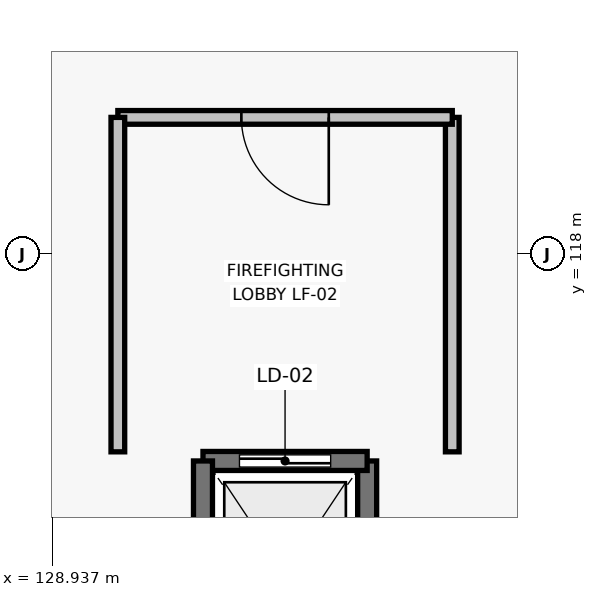
"""IFC4 building model, lengths in metres.
Left out: names, types, materials, properties, quantities, classifications, styles, units other than length and angle.
Written with IfcOpenShell. Run it as: python <this file> out.ifc"""

import sys

from ifc_helpers import new_model, si_unit, direction, frame, frame_2d, origin, place, context, subcontext, project, spatial, rectangle, extrude, element, fill, save


model = new_model("IFC4")
c1 = context("Model", 3, precision=1e-05, world=origin(), true_north=direction((0.0, 1.0)))
c2 = subcontext(c1, "Body", "Model", "MODEL_VIEW")
j1 = project(units=[si_unit("LENGTHUNIT", "METRE"), si_unit("PLANEANGLEUNIT", "RADIAN")], contexts=[c1])
p1 = place(None, origin())
s1 = spatial("IfcSite", under=j1, at=p1, CompositionType="ELEMENT")
p2 = place(p1, origin())
s2 = spatial("IfcBuilding", under=s1, at=p2, CompositionType="ELEMENT")
p3 = place(p2, frame((0.0, 0.0, 10.8)))
s3 = spatial("IfcBuildingStorey", under=s2, at=p3, CompositionType="ELEMENT", Elevation=10.8)
p4 = place(p3, frame((133.08, 112.32, 0.0), z_axis=(0.0, 0.0, 1.0), x_axis=(0.0, 1.0, 0.0)))
e1 = element("IfcWall", 1, at=p4, inside=s3, PredefinedType="SHEAR", context=c2, shape_type="SweptSolid", body=[
    extrude(rectangle(XDim=2.96, YDim=0.25, at=frame_2d((1.48, 0.0))), origin(), (0.0, 0.0, 1.0), 5.8),
])
p5 = place(p3, frame((133.08, 115.28, 0.0), z_axis=(0.0, 0.0, 1.0), x_axis=(-1.0, 0.0, 0.0)))
e2 = element("IfcWall", 2, at=p5, inside=s3, PredefinedType="SHEAR", context=c2, shape_type="SweptSolid", body=[
    extrude(rectangle(XDim=2.16, YDim=0.25, at=frame_2d((1.08, 0.0))), origin(), (0.0, 0.0, 1.0), 5.8),
])
p6 = place(p5, frame((0.48, 0.0, 0.0)))
e3 = element("IfcOpeningElement", 3, at=p6, cuts=e2, PredefinedType="OPENING", context=c2, shape_type="SweptSolid", body=[
    extrude(rectangle(XDim=1.2, YDim=2.2, at=frame_2d((0.6, 1.1))), frame((0.0, 0.135, 0.0), z_axis=(0.0, -1.0, 0.0), x_axis=(1.0, 0.0, 0.0)), (0.0, 0.0, 1.0), 0.27),
])
p7 = place(p3, frame((130.92, 115.28, 0.0), z_axis=(0.0, 0.0, 1.0), x_axis=(0.0, -1.0, 0.0)))
e4 = element("IfcWall", 4, at=p7, inside=s3, PredefinedType="SHEAR", context=c2, shape_type="SweptSolid", body=[
    extrude(rectangle(XDim=2.96, YDim=0.25, at=frame_2d((1.48, 0.0))), origin(), (0.0, 0.0, 1.0), 5.8),
])
p8 = place(p3, frame((134.2, 115.4, 0.0), z_axis=(0.0, 0.0, 1.0), x_axis=(0.0, 1.0, 0.0)))
e5 = element("IfcWall", 5, at=p8, inside=s3, PredefinedType="PARTITIONING", context=c2, shape_type="SweptSolid", body=[
    extrude(rectangle(XDim=4.4, YDim=0.18, at=frame_2d((2.2, 0.0))), origin(), (0.0, 0.0, 1.0), 5.465),
])
p9 = place(p3, frame((134.2, 119.8, 0.0), z_axis=(0.0, 0.0, 1.0), x_axis=(-1.0, 0.0, 0.0)))
e6 = element("IfcWall", 6, at=p9, inside=s3, PredefinedType="PARTITIONING", context=c2, shape_type="SweptSolid", body=[
    extrude(rectangle(XDim=4.4, YDim=0.18, at=frame_2d((2.2, 0.0))), origin(), (0.0, 0.0, 1.0), 5.8),
])
p10 = place(p9, frame((1.625, 0.0, 0.0)))
e7 = element("IfcOpeningElement", 7, at=p10, cuts=e6, PredefinedType="OPENING", context=c2, shape_type="SweptSolid", body=[
    extrude(rectangle(XDim=1.15, YDim=2.2, at=frame_2d((0.575, 1.1))), frame((0.0, 0.1, 0.0), z_axis=(0.0, -1.0, 0.0), x_axis=(1.0, 0.0, 0.0)), (0.0, 0.0, 1.0), 0.2),
])
p11 = place(p3, frame((129.8, 119.8, 0.0), z_axis=(0.0, 0.0, 1.0), x_axis=(0.0, -1.0, 0.0)))
e8 = element("IfcWall", 8, at=p11, inside=s3, PredefinedType="PARTITIONING", context=c2, shape_type="SweptSolid", body=[
    extrude(rectangle(XDim=4.4, YDim=0.18, at=frame_2d((2.2, 0.0))), origin(), (0.0, 0.0, 1.0), 5.8),
])
p12 = place(p6, origin())
e9 = element("IfcDoor", 9, at=p12, inside=s3, OperationType="SLIDING_TO_RIGHT", PredefinedType="DOOR", context=c2, shape_type="SweptSolid", body=[
    extrude(rectangle(XDim=1.2, YDim=2.2, at=frame_2d((0.6, 1.1))), frame((0.0, 0.025, 0.0), z_axis=(0.0, -1.0, 0.0), x_axis=(1.0, 0.0, 0.0)), (0.0, 0.0, 1.0), 0.05),
])
fill(e3, e9)
p13 = place(p10, origin())
e10 = element("IfcDoor", 10, at=p13, inside=s3, OperationType="SINGLE_SWING_LEFT", PredefinedType="DOOR", context=c2, shape_type="SweptSolid", body=[
    extrude(rectangle(XDim=1.15, YDim=2.2, at=frame_2d((0.575, 1.1))), frame((0.0, 0.025, 0.0), z_axis=(0.0, -1.0, 0.0), x_axis=(1.0, 0.0, 0.0)), (0.0, 0.0, 1.0), 0.05),
])
fill(e7, e10)
save(model, sys.argv[1])
